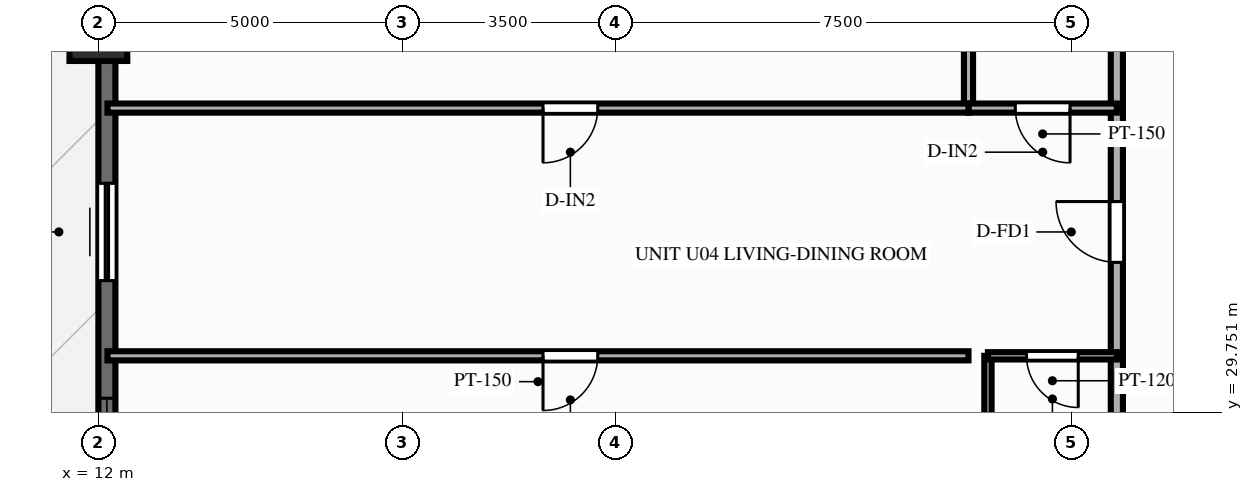
"""IFC4 building model, lengths in metres.
Left out: names, types, materials, properties, quantities, classifications, styles, units other than length and angle.
Written with IfcOpenShell. Run it as: python <this file> out.ifc"""

import sys

from ifc_helpers import new_model, si_unit, direction, frame, frame_2d, origin, origin_2d, place, context, subcontext, project, spatial, rectangle, extrude, source, transform, mapped, element, fill, save


model = new_model("IFC4")
c1 = context("Model", 3, precision=1e-05, world=origin(), true_north=direction((0.0, 1.0)))
c2 = subcontext(c1, "Body", "Model", "MODEL_VIEW")
j1 = project(units=[si_unit("LENGTHUNIT", "METRE"), si_unit("PLANEANGLEUNIT", "RADIAN")], contexts=[c1])
p1 = place(None, origin())
s1 = spatial("IfcSite", under=j1, at=p1, CompositionType="ELEMENT")
p2 = place(p1, origin())
s2 = spatial("IfcBuilding", under=s1, at=p2, CompositionType="ELEMENT")
p3 = place(p2, frame((0.0, 0.0, 135.75)))
s3 = spatial("IfcBuildingStorey", under=s2, at=p3, CompositionType="ELEMENT", Elevation=135.75)
m1 = source(origin(), c2, "Body", "SweptSolid", [
    extrude(rectangle(XDim=0.95, YDim=0.95, at=origin_2d()), origin(), (0.0, 0.0, 1.0), 3.0),
])
p4 = place(p3, frame((12.0, 36.0, 0.0), z_axis=(0.0, 0.0, 1.0), x_axis=(1.0, 0.0, 0.0)))
e1 = element("IfcColumn", 1, at=p4, inside=s3, PredefinedType="COLUMN", context=c2, shape_type="MappedRepresentation", body=[
    mapped(m1, transform((0.0, 0.0, 0.0), scale=1.0)),
])
p5 = place(p3, frame((12.14, 7.2, 0.0), z_axis=(0.0, 0.0, 1.0), x_axis=(0.0, 1.0, 0.0)))
e2 = element("IfcWall", 2, at=p5, inside=s3, PredefinedType="SOLIDWALL", context=c2, shape_type="SweptSolid", body=[
    extrude(rectangle(XDim=39.6, YDim=0.28, at=frame_2d((19.8, 0.0))), origin(), (0.0, 0.0, 1.0), 2.28),
])
p6 = place(p5, frame((0.945, 0.0, 0.25)))
e3 = element("IfcOpeningElement", 3, at=p6, cuts=e2, PredefinedType="OPENING", context=c2, shape_type="SweptSolid", body=[
    extrude(rectangle(XDim=1.2, YDim=1.5, at=frame_2d((0.6, 0.75))), frame((0.0, 0.152, 0.0), z_axis=(0.0, -1.0, 0.0), x_axis=(1.0, 0.0, 0.0)), (0.0, 0.0, 1.0), 0.304),
])
p7 = place(p5, frame((4.213, 0.0, 0.25)))
e4 = element("IfcOpeningElement", 4, at=p7, cuts=e2, PredefinedType="OPENING", context=c2, shape_type="SweptSolid", body=[
    extrude(rectangle(XDim=1.2, YDim=1.5, at=frame_2d((0.6, 0.75))), frame((0.0, 0.152, 0.0), z_axis=(0.0, -1.0, 0.0), x_axis=(1.0, 0.0, 0.0)), (0.0, 0.0, 1.0), 0.304),
])
p8 = place(p5, frame((7.55, 0.0, 0.25)))
e5 = element("IfcOpeningElement", 5, at=p8, cuts=e2, PredefinedType="OPENING", context=c2, shape_type="SweptSolid", body=[
    extrude(rectangle(XDim=1.2, YDim=1.5, at=frame_2d((0.6, 0.75))), frame((0.0, 0.152, 0.0), z_axis=(0.0, -1.0, 0.0), x_axis=(1.0, 0.0, 0.0)), (0.0, 0.0, 1.0), 0.304),
])
p9 = place(p5, frame((13.483, 0.0, 0.25)))
e6 = element("IfcOpeningElement", 6, at=p9, cuts=e2, PredefinedType="OPENING", context=c2, shape_type="SweptSolid", body=[
    extrude(rectangle(XDim=1.2, YDim=1.5, at=frame_2d((0.6, 0.75))), frame((0.0, 0.152, 0.0), z_axis=(0.0, -1.0, 0.0), x_axis=(1.0, 0.0, 0.0)), (0.0, 0.0, 1.0), 0.304),
])
p10 = place(p5, frame((16.82, 0.0, 0.25)))
e7 = element("IfcOpeningElement", 7, at=p10, cuts=e2, PredefinedType="OPENING", context=c2, shape_type="SweptSolid", body=[
    extrude(rectangle(XDim=1.2, YDim=1.5, at=frame_2d((0.6, 0.75))), frame((0.0, 0.152, 0.0), z_axis=(0.0, -1.0, 0.0), x_axis=(1.0, 0.0, 0.0)), (0.0, 0.0, 1.0), 0.304),
])
p11 = place(p5, frame((19.2, 0.0, 0.25)))
e8 = element("IfcOpeningElement", 8, at=p11, cuts=e2, PredefinedType="OPENING", context=c2, shape_type="SweptSolid", body=[
    extrude(rectangle(XDim=1.2, YDim=1.5, at=frame_2d((0.6, 0.75))), frame((0.0, 0.152, 0.0), z_axis=(0.0, -1.0, 0.0), x_axis=(1.0, 0.0, 0.0)), (0.0, 0.0, 1.0), 0.304),
])
p12 = place(p5, frame((21.578, 0.0, 0.25)))
e9 = element("IfcOpeningElement", 9, at=p12, cuts=e2, PredefinedType="OPENING", context=c2, shape_type="SweptSolid", body=[
    extrude(rectangle(XDim=1.2, YDim=1.5, at=frame_2d((0.6, 0.75))), frame((0.0, 0.152, 0.0), z_axis=(0.0, -1.0, 0.0), x_axis=(1.0, 0.0, 0.0)), (0.0, 0.0, 1.0), 0.304),
])
p13 = place(p5, frame((24.713, 0.0, 0.0)))
e10 = element("IfcOpeningElement", 10, at=p13, cuts=e2, PredefinedType="OPENING", context=c2, shape_type="SweptSolid", body=[
    extrude(rectangle(XDim=1.6, YDim=2.15, at=frame_2d((0.8, 1.075))), frame((0.0, 0.152, 0.0), z_axis=(0.0, -1.0, 0.0), x_axis=(1.0, 0.0, 0.0)), (0.0, 0.0, 1.0), 0.304),
])
p14 = place(p5, frame((29.305, 0.0, 0.25)))
e11 = element("IfcOpeningElement", 11, at=p14, cuts=e2, PredefinedType="OPENING", context=c2, shape_type="SweptSolid", body=[
    extrude(rectangle(XDim=0.7, YDim=1.5, at=frame_2d((0.35, 0.75))), frame((0.0, 0.152, 0.0), z_axis=(0.0, -1.0, 0.0), x_axis=(1.0, 0.0, 0.0)), (0.0, 0.0, 1.0), 0.304),
])
p15 = place(p5, frame((30.848, 0.0, 0.25)))
e12 = element("IfcOpeningElement", 12, at=p15, cuts=e2, PredefinedType="OPENING", context=c2, shape_type="SweptSolid", body=[
    extrude(rectangle(XDim=1.2, YDim=1.5, at=frame_2d((0.6, 0.75))), frame((0.0, 0.152, 0.0), z_axis=(0.0, -1.0, 0.0), x_axis=(1.0, 0.0, 0.0)), (0.0, 0.0, 1.0), 0.304),
])
p16 = place(p5, frame((34.183, 0.0, 0.25)))
e13 = element("IfcOpeningElement", 13, at=p16, cuts=e2, PredefinedType="OPENING", context=c2, shape_type="SweptSolid", body=[
    extrude(rectangle(XDim=1.2, YDim=1.5, at=frame_2d((0.6, 0.75))), frame((0.0, 0.152, 0.0), z_axis=(0.0, -1.0, 0.0), x_axis=(1.0, 0.0, 0.0)), (0.0, 0.0, 1.0), 0.304),
])
p17 = place(p5, frame((37.452, 0.0, 0.25)))
e14 = element("IfcOpeningElement", 14, at=p17, cuts=e2, PredefinedType="OPENING", context=c2, shape_type="SweptSolid", body=[
    extrude(rectangle(XDim=1.2, YDim=1.5, at=frame_2d((0.6, 0.75))), frame((0.0, 0.152, 0.0), z_axis=(0.0, -1.0, 0.0), x_axis=(1.0, 0.0, 0.0)), (0.0, 0.0, 1.0), 0.304),
])
p18 = place(p3, frame((28.75, 28.08, 0.0), z_axis=(0.0, 0.0, 1.0), x_axis=(0.0, 1.0, 0.0)))
e15 = element("IfcWall", 15, at=p18, inside=s3, PredefinedType="PARTITIONING", context=c2, shape_type="SweptSolid", body=[
    extrude(rectangle(XDim=2.595, YDim=0.2, at=frame_2d((1.298, 0.0))), origin(), (0.0, 0.0, 1.0), 2.79),
])
p19 = place(p3, frame((28.75, 30.676, 0.0), z_axis=(0.0, 0.0, 1.0), x_axis=(0.0, 1.0, 0.0)))
e16 = element("IfcWall", 16, at=p19, inside=s3, PredefinedType="PARTITIONING", context=c2, shape_type="SweptSolid", body=[
    extrude(rectangle(XDim=4.074, YDim=0.2, at=frame_2d((2.037, 0.0))), origin(), (0.0, 0.0, 1.0), 2.79),
])
p20 = place(p19, frame((1.537, 0.0, 0.0)))
e17 = element("IfcOpeningElement", 17, at=p20, cuts=e16, PredefinedType="OPENING", context=c2, shape_type="SweptSolid", body=[
    extrude(rectangle(XDim=1.0, YDim=2.15, at=frame_2d((0.5, 1.075))), frame((0.0, 0.112, 0.0), z_axis=(0.0, -1.0, 0.0), x_axis=(1.0, 0.0, 0.0)), (0.0, 0.0, 1.0), 0.224),
])
p21 = place(p3, frame((28.75, 34.75, 0.0), z_axis=(0.0, 0.0, 1.0), x_axis=(0.0, 1.0, 0.0)))
e18 = element("IfcWall", 18, at=p21, inside=s3, PredefinedType="PARTITIONING", context=c2, shape_type="SweptSolid", body=[
    extrude(rectangle(XDim=2.6, YDim=0.2, at=frame_2d((1.3, 0.0))), origin(), (0.0, 0.0, 1.0), 2.79),
])
p22 = place(p3, frame((26.63, 28.08, 0.0), z_axis=(0.0, 0.0, 1.0), x_axis=(0.0, 1.0, 0.0)))
e19 = element("IfcWall", 19, at=p22, inside=s3, PredefinedType="PARTITIONING", context=c2, shape_type="SweptSolid", body=[
    extrude(rectangle(XDim=2.595, YDim=0.12, at=frame_2d((1.298, 0.0))), origin(), (0.0, 0.0, 1.0), 2.79),
])
p23 = place(p3, frame((26.31, 34.75, 0.0), z_axis=(0.0, 0.0, 1.0), x_axis=(0.0, 1.0, 0.0)))
e20 = element("IfcWall", 20, at=p23, inside=s3, PredefinedType="PARTITIONING", context=c2, shape_type="SweptSolid", body=[
    extrude(rectangle(XDim=2.6, YDim=0.15, at=frame_2d((1.3, 0.0))), origin(), (0.0, 0.0, 1.0), 2.79),
])
p24 = place(p3, frame((28.75, 30.676, 0.0), z_axis=(0.0, 0.0, 1.0), x_axis=(-1.0, 0.0, 0.0)))
e21 = element("IfcWall", 21, at=p24, inside=s3, PredefinedType="PARTITIONING", context=c2, shape_type="SweptSolid", body=[
    extrude(rectangle(XDim=2.12, YDim=0.12, at=frame_2d((1.06, 0.0))), origin(), (0.0, 0.0, 1.0), 2.79),
])
p25 = place(p24, frame((0.635, 0.0, 0.0)))
e22 = element("IfcOpeningElement", 22, at=p25, cuts=e21, PredefinedType="OPENING", context=c2, shape_type="SweptSolid", body=[
    extrude(rectangle(XDim=0.85, YDim=2.05, at=frame_2d((0.425, 1.025))), frame((0.0, 0.072, 0.0), z_axis=(0.0, -1.0, 0.0), x_axis=(1.0, 0.0, 0.0)), (0.0, 0.0, 1.0), 0.144),
])
p26 = place(p3, frame((26.31, 30.676, 0.0), z_axis=(0.0, 0.0, 1.0), x_axis=(-1.0, 0.0, 0.0)))
e23 = element("IfcWall", 23, at=p26, inside=s3, PredefinedType="PARTITIONING", context=c2, shape_type="SweptSolid", body=[
    extrude(rectangle(XDim=14.16, YDim=0.15, at=frame_2d((7.08, 0.0))), origin(), (0.0, 0.0, 1.0), 2.79),
])
p27 = place(p26, frame((6.097, 0.0, 0.0)))
e24 = element("IfcOpeningElement", 24, at=p27, cuts=e23, PredefinedType="OPENING", context=c2, shape_type="SweptSolid", body=[
    extrude(rectangle(XDim=0.9, YDim=2.1, at=frame_2d((0.45, 1.05))), frame((0.0, 0.087, 0.0), z_axis=(0.0, -1.0, 0.0), x_axis=(1.0, 0.0, 0.0)), (0.0, 0.0, 1.0), 0.174),
])
p28 = place(p3, frame((28.75, 34.75, 0.0), z_axis=(0.0, 0.0, 1.0), x_axis=(-1.0, 0.0, 0.0)))
e25 = element("IfcWall", 25, at=p28, inside=s3, PredefinedType="PARTITIONING", context=c2, shape_type="SweptSolid", body=[
    extrude(rectangle(XDim=2.44, YDim=0.15, at=frame_2d((1.22, 0.0))), origin(), (0.0, 0.0, 1.0), 2.79),
])
p29 = place(p28, frame((0.77, 0.0, 0.0)))
e26 = element("IfcOpeningElement", 26, at=p29, cuts=e25, PredefinedType="OPENING", context=c2, shape_type="SweptSolid", body=[
    extrude(rectangle(XDim=0.9, YDim=2.1, at=frame_2d((0.45, 1.05))), frame((0.0, 0.087, 0.0), z_axis=(0.0, -1.0, 0.0), x_axis=(1.0, 0.0, 0.0)), (0.0, 0.0, 1.0), 0.174),
])
p30 = place(p3, frame((26.31, 34.75, 0.0), z_axis=(0.0, 0.0, 1.0), x_axis=(-1.0, 0.0, 0.0)))
e27 = element("IfcWall", 27, at=p30, inside=s3, PredefinedType="PARTITIONING", context=c2, shape_type="SweptSolid", body=[
    extrude(rectangle(XDim=14.16, YDim=0.15, at=frame_2d((7.08, 0.0))), origin(), (0.0, 0.0, 1.0), 2.79),
])
p31 = place(p30, frame((6.097, 0.0, 0.0)))
e28 = element("IfcOpeningElement", 28, at=p31, cuts=e27, PredefinedType="OPENING", context=c2, shape_type="SweptSolid", body=[
    extrude(rectangle(XDim=0.9, YDim=2.1, at=frame_2d((0.45, 1.05))), frame((0.0, 0.087, 0.0), z_axis=(0.0, -1.0, 0.0), x_axis=(1.0, 0.0, 0.0)), (0.0, 0.0, 1.0), 0.174),
])
m2 = source(origin(), c2, "Body", "SweptSolid", [
    extrude(rectangle(XDim=1.2, YDim=1.5, at=frame_2d((0.6, 0.75))), frame((0.0, 0.03, 0.0), z_axis=(0.0, -1.0, 0.0), x_axis=(1.0, 0.0, 0.0)), (0.0, 0.0, 1.0), 0.06),
])
p32 = place(p12, origin())
e29 = element("IfcWindow", 29, at=p32, inside=s3, PartitioningType="SINGLE_PANEL", PredefinedType="WINDOW", context=c2, shape_type="MappedRepresentation", body=[
    mapped(m2, transform((0.0, 0.0, 0.0), scale=1.0)),
])
fill(e9, e29)
m3 = source(origin(), c2, "Body", "SweptSolid", [
    extrude(rectangle(XDim=1.6, YDim=2.15, at=frame_2d((0.8, 1.075))), frame((0.0, 0.025, 0.0), z_axis=(0.0, -1.0, 0.0), x_axis=(1.0, 0.0, 0.0)), (0.0, 0.0, 1.0), 0.05),
])
p33 = place(p13, origin())
e30 = element("IfcDoor", 30, at=p33, inside=s3, OperationType="SLIDING_TO_LEFT", PredefinedType="DOOR", context=c2, shape_type="MappedRepresentation", body=[
    mapped(m3, transform((0.0, 0.0, 0.0), scale=1.0)),
])
fill(e10, e30)
m4 = source(origin(), c2, "Body", "SweptSolid", [
    extrude(rectangle(XDim=1.0, YDim=2.15, at=frame_2d((0.5, 1.075))), frame((0.0, 0.025, 0.0), z_axis=(0.0, -1.0, 0.0), x_axis=(1.0, 0.0, 0.0)), (0.0, 0.0, 1.0), 0.05),
])
p34 = place(p20, origin())
e31 = element("IfcDoor", 31, at=p34, inside=s3, OperationType="SINGLE_SWING_RIGHT", PredefinedType="DOOR", context=c2, shape_type="MappedRepresentation", body=[
    mapped(m4, transform((0.0, 0.0, 0.0), scale=1.0)),
])
fill(e17, e31)
m5 = source(origin(), c2, "Body", "SweptSolid", [
    extrude(rectangle(XDim=0.85, YDim=2.05, at=frame_2d((0.425, 1.025))), frame((0.0, 0.025, 0.0), z_axis=(0.0, -1.0, 0.0), x_axis=(1.0, 0.0, 0.0)), (0.0, 0.0, 1.0), 0.05),
])
p35 = place(p25, origin())
e32 = element("IfcDoor", 32, at=p35, inside=s3, OperationType="SINGLE_SWING_LEFT", PredefinedType="DOOR", context=c2, shape_type="MappedRepresentation", body=[
    mapped(m5, transform((0.0, 0.0, 0.0), scale=1.0)),
])
fill(e22, e32)
m6 = source(origin(), c2, "Body", "SweptSolid", [
    extrude(rectangle(XDim=0.9, YDim=2.1, at=frame_2d((0.45, 1.05))), frame((0.0, 0.025, 0.0), z_axis=(0.0, -1.0, 0.0), x_axis=(1.0, 0.0, 0.0)), (0.0, 0.0, 1.0), 0.05),
])
p36 = place(p27, origin())
e33 = element("IfcDoor", 33, at=p36, inside=s3, OperationType="SINGLE_SWING_RIGHT", PredefinedType="DOOR", context=c2, shape_type="MappedRepresentation", body=[
    mapped(m6, transform((0.0, 0.0, 0.0), scale=1.0)),
])
fill(e24, e33)
p37 = place(p29, origin())
e34 = element("IfcDoor", 34, at=p37, inside=s3, OperationType="SINGLE_SWING_LEFT", PredefinedType="DOOR", context=c2, shape_type="MappedRepresentation", body=[
    mapped(m6, transform((0.0, 0.0, 0.0), scale=1.0)),
])
fill(e26, e34)
p38 = place(p31, origin())
e35 = element("IfcDoor", 35, at=p38, inside=s3, OperationType="SINGLE_SWING_RIGHT", PredefinedType="DOOR", context=c2, shape_type="MappedRepresentation", body=[
    mapped(m6, transform((0.0, 0.0, 0.0), scale=1.0)),
])
fill(e28, e35)
save(model, sys.argv[1])
